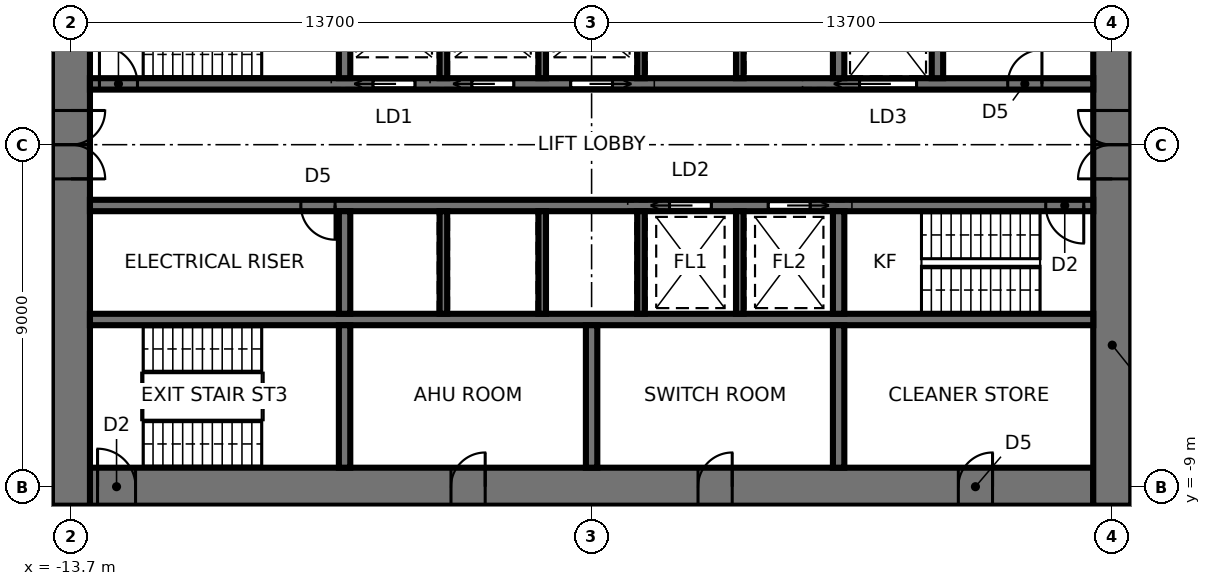
"""IFC4 building model, lengths in metres.
Left out: names, types, materials, properties, quantities, classifications, styles, units other than length and angle.
Written with IfcOpenShell. Run it as: python <this file> out.ifc"""

import sys

from ifc_helpers import new_model, si_unit, direction, frame, frame_2d, origin, place, context, subcontext, project, spatial, rectangle, extrude, element, fill, save


model = new_model("IFC4")
c1 = context("Model", 3, precision=1e-05, world=origin(), true_north=direction((0.0, 1.0)))
c2 = subcontext(c1, "Body", "Model", "MODEL_VIEW")
j1 = project(units=[si_unit("LENGTHUNIT", "METRE"), si_unit("PLANEANGLEUNIT", "RADIAN")], contexts=[c1])
p1 = place(None, origin())
s1 = spatial("IfcSite", under=j1, at=p1, CompositionType="ELEMENT")
p2 = place(p1, origin())
s2 = spatial("IfcBuilding", under=s1, at=p2, CompositionType="ELEMENT")
p3 = place(p2, frame((0.0, 0.0, 10.6)))
s3 = spatial("IfcBuildingStorey", under=s2, at=p3, CompositionType="ELEMENT", Elevation=10.6)
p4 = place(p3, frame((-13.2, -9.0, 0.0), z_axis=(0.0, 0.0, 1.0), x_axis=(1.0, 0.0, 0.0)))
e1 = element("IfcWall", 1, at=p4, inside=s3, PredefinedType="SHEAR", context=c2, shape_type="SweptSolid", body=[
    extrude(rectangle(XDim=26.4, YDim=1.0, at=frame_2d((13.2, 0.0))), origin(), (0.0, 0.0, 1.0), 4.5),
])
p5 = place(p4, frame((0.2, 0.0, 0.0)))
e2 = element("IfcOpeningElement", 2, at=p5, cuts=e1, PredefinedType="OPENING", context=c2, shape_type="SweptSolid", body=[
    extrude(rectangle(XDim=1.0, YDim=2.1, at=frame_2d((0.5, 1.05))), frame((0.0, 0.51, 0.0), z_axis=(0.0, -1.0, 0.0), x_axis=(1.0, 0.0, 0.0)), (0.0, 0.0, 1.0), 1.02),
])
p6 = place(p4, frame((9.5, 0.0, 0.0)))
e3 = element("IfcOpeningElement", 3, at=p6, cuts=e1, PredefinedType="OPENING", context=c2, shape_type="SweptSolid", body=[
    extrude(rectangle(XDim=0.9, YDim=2.1, at=frame_2d((0.45, 1.05))), frame((0.0, 0.51, 0.0), z_axis=(0.0, -1.0, 0.0), x_axis=(1.0, 0.0, 0.0)), (0.0, 0.0, 1.0), 1.02),
])
p7 = place(p4, frame((16.0, 0.0, 0.0)))
e4 = element("IfcOpeningElement", 4, at=p7, cuts=e1, PredefinedType="OPENING", context=c2, shape_type="SweptSolid", body=[
    extrude(rectangle(XDim=0.9, YDim=2.1, at=frame_2d((0.45, 1.05))), frame((0.0, 0.51, 0.0), z_axis=(0.0, -1.0, 0.0), x_axis=(1.0, 0.0, 0.0)), (0.0, 0.0, 1.0), 1.02),
])
p8 = place(p4, frame((22.85, 0.0, 0.0)))
e5 = element("IfcOpeningElement", 5, at=p8, cuts=e1, PredefinedType="OPENING", context=c2, shape_type="SweptSolid", body=[
    extrude(rectangle(XDim=0.9, YDim=2.1, at=frame_2d((0.45, 1.05))), frame((0.0, 0.51, 0.0), z_axis=(0.0, -1.0, 0.0), x_axis=(1.0, 0.0, 0.0)), (0.0, 0.0, 1.0), 1.02),
])
p9 = place(p3, frame((13.7, -9.5, 0.0), z_axis=(0.0, 0.0, 1.0), x_axis=(0.0, 1.0, 0.0)))
e6 = element("IfcWall", 6, at=p9, inside=s3, PredefinedType="SHEAR", context=c2, shape_type="SweptSolid", body=[
    extrude(rectangle(XDim=19.0, YDim=1.0, at=frame_2d((9.5, 0.0))), origin(), (0.0, 0.0, 1.0), 4.5),
])
p10 = place(p9, frame((8.6, 0.0, 0.0)))
e7 = element("IfcOpeningElement", 7, at=p10, cuts=e6, PredefinedType="OPENING", context=c2, shape_type="SweptSolid", body=[
    extrude(rectangle(XDim=1.8, YDim=2.4, at=frame_2d((0.9, 1.2))), frame((0.0, 0.51, 0.0), z_axis=(0.0, -1.0, 0.0), x_axis=(1.0, 0.0, 0.0)), (0.0, 0.0, 1.0), 1.02),
])
p11 = place(p3, frame((-13.7, 9.5, 0.0), z_axis=(0.0, 0.0, 1.0), x_axis=(0.0, -1.0, 0.0)))
e8 = element("IfcWall", 8, at=p11, inside=s3, PredefinedType="SHEAR", context=c2, shape_type="SweptSolid", body=[
    extrude(rectangle(XDim=19.0, YDim=1.0, at=frame_2d((9.5, 0.0))), origin(), (0.0, 0.0, 1.0), 4.5),
])
p12 = place(p11, frame((8.6, 0.0, 0.0)))
e9 = element("IfcOpeningElement", 9, at=p12, cuts=e8, PredefinedType="OPENING", context=c2, shape_type="SweptSolid", body=[
    extrude(rectangle(XDim=1.8, YDim=2.4, at=frame_2d((0.9, 1.2))), frame((0.0, 0.51, 0.0), z_axis=(0.0, -1.0, 0.0), x_axis=(1.0, 0.0, 0.0)), (0.0, 0.0, 1.0), 1.02),
])
p13 = place(p3, frame((-13.2, 1.6, 0.0), z_axis=(0.0, 0.0, 1.0), x_axis=(1.0, 0.0, 0.0)))
e10 = element("IfcWall", 10, at=p13, inside=s3, PredefinedType="SHEAR", context=c2, shape_type="SweptSolid", body=[
    extrude(rectangle(XDim=26.4, YDim=0.3, at=frame_2d((13.2, 0.0))), origin(), (0.0, 0.0, 1.0), 4.5),
])
p14 = place(p13, frame((0.25, 0.0, 0.0)))
e11 = element("IfcOpeningElement", 11, at=p14, cuts=e10, PredefinedType="OPENING", context=c2, shape_type="SweptSolid", body=[
    extrude(rectangle(XDim=1.0, YDim=2.1, at=frame_2d((0.5, 1.05))), frame((0.0, 0.16, 0.0), z_axis=(0.0, -1.0, 0.0), x_axis=(1.0, 0.0, 0.0)), (0.0, 0.0, 1.0), 0.32),
])
p15 = place(p13, frame((20.25, 0.0, 0.0)))
e12 = element("IfcOpeningElement", 12, at=p15, cuts=e10, PredefinedType="OPENING", context=c2, shape_type="SweptSolid", body=[
    extrude(rectangle(XDim=1.5, YDim=2.4, at=frame_2d((0.75, 1.2))), frame((0.0, 0.16, 0.0), z_axis=(0.0, -1.0, 0.0), x_axis=(1.0, 0.0, 0.0)), (0.0, 0.0, 1.0), 0.32),
])
p16 = place(p13, frame((7.45, 0.0, 0.0)))
e13 = element("IfcOpeningElement", 13, at=p16, cuts=e10, PredefinedType="OPENING", context=c2, shape_type="SweptSolid", body=[
    extrude(rectangle(XDim=1.1, YDim=2.3, at=frame_2d((0.55, 1.15))), frame((0.0, 0.16, 0.0), z_axis=(0.0, -1.0, 0.0), x_axis=(1.0, 0.0, 0.0)), (0.0, 0.0, 1.0), 0.32),
])
p17 = place(p13, frame((10.05, 0.0, 0.0)))
e14 = element("IfcOpeningElement", 14, at=p17, cuts=e10, PredefinedType="OPENING", context=c2, shape_type="SweptSolid", body=[
    extrude(rectangle(XDim=1.1, YDim=2.3, at=frame_2d((0.55, 1.15))), frame((0.0, 0.16, 0.0), z_axis=(0.0, -1.0, 0.0), x_axis=(1.0, 0.0, 0.0)), (0.0, 0.0, 1.0), 0.32),
])
p18 = place(p13, frame((12.65, 0.0, 0.0)))
e15 = element("IfcOpeningElement", 15, at=p18, cuts=e10, PredefinedType="OPENING", context=c2, shape_type="SweptSolid", body=[
    extrude(rectangle(XDim=1.1, YDim=2.3, at=frame_2d((0.55, 1.15))), frame((0.0, 0.16, 0.0), z_axis=(0.0, -1.0, 0.0), x_axis=(1.0, 0.0, 0.0)), (0.0, 0.0, 1.0), 0.32),
])
p19 = place(p13, frame((24.15, 0.0, 0.0)))
e16 = element("IfcOpeningElement", 16, at=p19, cuts=e10, PredefinedType="OPENING", context=c2, shape_type="SweptSolid", body=[
    extrude(rectangle(XDim=0.9, YDim=2.1, at=frame_2d((0.45, 1.05))), frame((0.0, 0.16, 0.0), z_axis=(0.0, -1.0, 0.0), x_axis=(1.0, 0.0, 0.0)), (0.0, 0.0, 1.0), 0.32),
])
p20 = place(p3, frame((-13.2, -1.6, 0.0), z_axis=(0.0, 0.0, 1.0), x_axis=(1.0, 0.0, 0.0)))
e17 = element("IfcWall", 17, at=p20, inside=s3, PredefinedType="SHEAR", context=c2, shape_type="SweptSolid", body=[
    extrude(rectangle(XDim=26.4, YDim=0.3, at=frame_2d((13.2, 0.0))), origin(), (0.0, 0.0, 1.0), 4.5),
])
p21 = place(p20, frame((25.15, 0.0, 0.0)))
e18 = element("IfcOpeningElement", 18, at=p21, cuts=e17, PredefinedType="OPENING", context=c2, shape_type="SweptSolid", body=[
    extrude(rectangle(XDim=1.0, YDim=2.1, at=frame_2d((0.5, 1.05))), frame((0.0, 0.16, 0.0), z_axis=(0.0, -1.0, 0.0), x_axis=(1.0, 0.0, 0.0)), (0.0, 0.0, 1.0), 0.32),
])
p22 = place(p20, frame((15.25, 0.0, 0.0)))
e19 = element("IfcOpeningElement", 19, at=p22, cuts=e17, PredefinedType="OPENING", context=c2, shape_type="SweptSolid", body=[
    extrude(rectangle(XDim=1.1, YDim=2.3, at=frame_2d((0.55, 1.15))), frame((0.0, 0.16, 0.0), z_axis=(0.0, -1.0, 0.0), x_axis=(1.0, 0.0, 0.0)), (0.0, 0.0, 1.0), 0.32),
])
p23 = place(p20, frame((17.85, 0.0, 0.0)))
e20 = element("IfcOpeningElement", 20, at=p23, cuts=e17, PredefinedType="OPENING", context=c2, shape_type="SweptSolid", body=[
    extrude(rectangle(XDim=1.1, YDim=2.3, at=frame_2d((0.55, 1.15))), frame((0.0, 0.16, 0.0), z_axis=(0.0, -1.0, 0.0), x_axis=(1.0, 0.0, 0.0)), (0.0, 0.0, 1.0), 0.32),
])
p24 = place(p20, frame((5.55, 0.0, 0.0)))
e21 = element("IfcOpeningElement", 21, at=p24, cuts=e17, PredefinedType="OPENING", context=c2, shape_type="SweptSolid", body=[
    extrude(rectangle(XDim=0.9, YDim=2.1, at=frame_2d((0.45, 1.05))), frame((0.0, 0.16, 0.0), z_axis=(0.0, -1.0, 0.0), x_axis=(1.0, 0.0, 0.0)), (0.0, 0.0, 1.0), 0.32),
])
p25 = place(p3, frame((-13.2, -4.6, 0.0), z_axis=(0.0, 0.0, 1.0), x_axis=(1.0, 0.0, 0.0)))
e22 = element("IfcWall", 22, at=p25, inside=s3, PredefinedType="SHEAR", context=c2, shape_type="SweptSolid", body=[
    extrude(rectangle(XDim=26.4, YDim=0.3, at=frame_2d((13.2, 0.0))), origin(), (0.0, 0.0, 1.0), 4.5),
])
for number, where, z_axis, x_axis in (
    (23, (-6.5, 1.75, 0.0), (0.0, 0.0, 1.0), (0.0, 1.0, 0.0)),
    (24, (6.5, 1.75, 0.0), (0.0, 0.0, 1.0), (0.0, 1.0, 0.0)),
):
    element("IfcWall", number, at=place(p3, frame(where, z_axis=z_axis, x_axis=x_axis)), inside=s3, PredefinedType="SHEAR", context=c2, shape_type="SweptSolid", body=[
        extrude(rectangle(XDim=2.7, YDim=0.3, at=frame_2d((1.35, 0.0))), origin(), (0.0, 0.0, 1.0), 4.5),
    ])
for number, where, z_axis, x_axis in (
    (25, (-3.9, 1.75, 0.0), (0.0, 0.0, 1.0), (0.0, 1.0, 0.0)),
    (26, (-1.3, 1.75, 0.0), (0.0, 0.0, 1.0), (0.0, 1.0, 0.0)),
    (27, (1.3, 1.75, 0.0), (0.0, 0.0, 1.0), (0.0, 1.0, 0.0)),
    (28, (3.9, 1.75, 0.0), (0.0, 0.0, 1.0), (0.0, 1.0, 0.0)),
):
    element("IfcWall", number, at=place(p3, frame(where, z_axis=z_axis, x_axis=x_axis)), inside=s3, PredefinedType="SHEAR", context=c2, shape_type="SweptSolid", body=[
        extrude(rectangle(XDim=2.7, YDim=0.2, at=frame_2d((1.35, 0.0))), origin(), (0.0, 0.0, 1.0), 4.5),
    ])
p26 = place(p3, frame((-6.5, -1.75, 0.0), z_axis=(0.0, 0.0, 1.0), x_axis=(0.0, -1.0, 0.0)))
e29 = element("IfcWall", 29, at=p26, inside=s3, PredefinedType="SHEAR", context=c2, shape_type="SweptSolid", body=[
    extrude(rectangle(XDim=2.7, YDim=0.3, at=frame_2d((1.35, 0.0))), origin(), (0.0, 0.0, 1.0), 4.5),
])
p27 = place(p3, frame((-6.5, -4.75, 0.0), z_axis=(0.0, 0.0, 1.0), x_axis=(0.0, -1.0, 0.0)))
e30 = element("IfcWall", 30, at=p27, inside=s3, PredefinedType="SHEAR", context=c2, shape_type="SweptSolid", body=[
    extrude(rectangle(XDim=3.75, YDim=0.3, at=frame_2d((1.875, 0.0))), origin(), (0.0, 0.0, 1.0), 4.5),
])
p28 = place(p3, frame((6.5, -1.75, 0.0), z_axis=(0.0, 0.0, 1.0), x_axis=(0.0, -1.0, 0.0)))
e31 = element("IfcWall", 31, at=p28, inside=s3, PredefinedType="SHEAR", context=c2, shape_type="SweptSolid", body=[
    extrude(rectangle(XDim=2.7, YDim=0.3, at=frame_2d((1.35, 0.0))), origin(), (0.0, 0.0, 1.0), 4.5),
])
p29 = place(p3, frame((6.5, -4.75, 0.0), z_axis=(0.0, 0.0, 1.0), x_axis=(0.0, -1.0, 0.0)))
e32 = element("IfcWall", 32, at=p29, inside=s3, PredefinedType="SHEAR", context=c2, shape_type="SweptSolid", body=[
    extrude(rectangle(XDim=3.75, YDim=0.3, at=frame_2d((1.875, 0.0))), origin(), (0.0, 0.0, 1.0), 4.5),
])
for number, where, z_axis, x_axis in (
    (33, (-3.9, -1.75, 0.0), (0.0, 0.0, 1.0), (0.0, -1.0, 0.0)),
    (34, (-1.3, -1.75, 0.0), (0.0, 0.0, 1.0), (0.0, -1.0, 0.0)),
    (35, (1.3, -1.75, 0.0), (0.0, 0.0, 1.0), (0.0, -1.0, 0.0)),
    (36, (3.9, -1.75, 0.0), (0.0, 0.0, 1.0), (0.0, -1.0, 0.0)),
):
    element("IfcWall", number, at=place(p3, frame(where, z_axis=z_axis, x_axis=x_axis)), inside=s3, PredefinedType="SHEAR", context=c2, shape_type="SweptSolid", body=[
        extrude(rectangle(XDim=2.7, YDim=0.2, at=frame_2d((1.35, 0.0))), origin(), (0.0, 0.0, 1.0), 4.5),
    ])
p30 = place(p3, frame((0.0, -4.75, 0.0), z_axis=(0.0, 0.0, 1.0), x_axis=(0.0, -1.0, 0.0)))
e37 = element("IfcWall", 37, at=p30, inside=s3, PredefinedType="SHEAR", context=c2, shape_type="SweptSolid", body=[
    extrude(rectangle(XDim=3.75, YDim=0.3, at=frame_2d((1.875, 0.0))), origin(), (0.0, 0.0, 1.0), 4.5),
])
p31 = place(p3, frame((9.1, 1.75, 0.0), z_axis=(0.0, 0.0, 1.0), x_axis=(0.0, 1.0, 0.0)))
e38 = element("IfcWall", 38, at=p31, inside=s3, PredefinedType="SHEAR", context=c2, shape_type="SweptSolid", body=[
    extrude(rectangle(XDim=2.7, YDim=0.3, at=frame_2d((1.35, 0.0))), origin(), (0.0, 0.0, 1.0), 4.5),
])
p32 = place(p12, origin())
e39 = element("IfcDoor", 39, at=p32, inside=s3, OperationType="DOUBLE_DOOR_SINGLE_SWING", PredefinedType="DOOR", context=c2, shape_type="SweptSolid", body=[
    extrude(rectangle(XDim=1.72, YDim=2.36, at=frame_2d((0.9, 1.18))), frame((0.0, 0.025, 0.0), z_axis=(0.0, -1.0, 0.0), x_axis=(1.0, 0.0, 0.0)), (0.0, 0.0, 1.0), 0.05),
    extrude(rectangle(XDim=0.04, YDim=2.4, at=frame_2d((0.02, 1.2))), frame((0.0, 0.25, 0.0), z_axis=(0.0, -1.0, 0.0), x_axis=(1.0, 0.0, 0.0)), (0.0, 0.0, 1.0), 0.5),
    extrude(rectangle(XDim=0.04, YDim=2.4, at=frame_2d((1.78, 1.2))), frame((0.0, 0.25, 0.0), z_axis=(0.0, -1.0, 0.0), x_axis=(1.0, 0.0, 0.0)), (0.0, 0.0, 1.0), 0.5),
    extrude(rectangle(XDim=1.72, YDim=0.04, at=frame_2d((0.9, 2.38))), frame((0.0, 0.25, 0.0), z_axis=(0.0, -1.0, 0.0), x_axis=(1.0, 0.0, 0.0)), (0.0, 0.0, 1.0), 0.5),
])
fill(e9, e39)
p33 = place(p10, origin())
e40 = element("IfcDoor", 40, at=p33, inside=s3, OperationType="DOUBLE_DOOR_SINGLE_SWING", PredefinedType="DOOR", context=c2, shape_type="SweptSolid", body=[
    extrude(rectangle(XDim=1.72, YDim=2.36, at=frame_2d((0.9, 1.18))), frame((0.0, 0.025, 0.0), z_axis=(0.0, -1.0, 0.0), x_axis=(1.0, 0.0, 0.0)), (0.0, 0.0, 1.0), 0.05),
    extrude(rectangle(XDim=0.04, YDim=2.4, at=frame_2d((0.02, 1.2))), frame((0.0, 0.25, 0.0), z_axis=(0.0, -1.0, 0.0), x_axis=(1.0, 0.0, 0.0)), (0.0, 0.0, 1.0), 0.5),
    extrude(rectangle(XDim=0.04, YDim=2.4, at=frame_2d((1.78, 1.2))), frame((0.0, 0.25, 0.0), z_axis=(0.0, -1.0, 0.0), x_axis=(1.0, 0.0, 0.0)), (0.0, 0.0, 1.0), 0.5),
    extrude(rectangle(XDim=1.72, YDim=0.04, at=frame_2d((0.9, 2.38))), frame((0.0, 0.25, 0.0), z_axis=(0.0, -1.0, 0.0), x_axis=(1.0, 0.0, 0.0)), (0.0, 0.0, 1.0), 0.5),
])
fill(e7, e40)
p34 = place(p14, origin())
e41 = element("IfcDoor", 41, at=p34, inside=s3, OperationType="SINGLE_SWING_LEFT", PredefinedType="DOOR", context=c2, shape_type="SweptSolid", body=[
    extrude(rectangle(XDim=1.0, YDim=2.1, at=frame_2d((0.5, 1.05))), frame((0.0, 0.025, 0.0), z_axis=(0.0, -1.0, 0.0), x_axis=(1.0, 0.0, 0.0)), (0.0, 0.0, 1.0), 0.05),
])
fill(e11, e41)
p35 = place(p21, frame((1.0, 0.0, 0.0), z_axis=(0.0, 0.0, 1.0), x_axis=(-1.0, 0.0, 0.0)))
e42 = element("IfcDoor", 42, at=p35, inside=s3, OperationType="SINGLE_SWING_LEFT", PredefinedType="DOOR", context=c2, shape_type="SweptSolid", body=[
    extrude(rectangle(XDim=1.0, YDim=2.1, at=frame_2d((0.5, 1.05))), frame((0.0, 0.025, 0.0), z_axis=(0.0, -1.0, 0.0), x_axis=(1.0, 0.0, 0.0)), (0.0, 0.0, 1.0), 0.05),
])
fill(e18, e42)
p36 = place(p5, origin())
e43 = element("IfcDoor", 43, at=p36, inside=s3, OperationType="SINGLE_SWING_LEFT", PredefinedType="DOOR", context=c2, shape_type="SweptSolid", body=[
    extrude(rectangle(XDim=0.92, YDim=2.06, at=frame_2d((0.5, 1.03))), frame((0.0, 0.025, 0.0), z_axis=(0.0, -1.0, 0.0), x_axis=(1.0, 0.0, 0.0)), (0.0, 0.0, 1.0), 0.05),
    extrude(rectangle(XDim=0.04, YDim=2.1, at=frame_2d((0.02, 1.05))), frame((0.0, 0.25, 0.0), z_axis=(0.0, -1.0, 0.0), x_axis=(1.0, 0.0, 0.0)), (0.0, 0.0, 1.0), 0.5),
    extrude(rectangle(XDim=0.04, YDim=2.1, at=frame_2d((0.98, 1.05))), frame((0.0, 0.25, 0.0), z_axis=(0.0, -1.0, 0.0), x_axis=(1.0, 0.0, 0.0)), (0.0, 0.0, 1.0), 0.5),
    extrude(rectangle(XDim=0.92, YDim=0.04, at=frame_2d((0.5, 2.08))), frame((0.0, 0.25, 0.0), z_axis=(0.0, -1.0, 0.0), x_axis=(1.0, 0.0, 0.0)), (0.0, 0.0, 1.0), 0.5),
])
fill(e2, e43)
p37 = place(p15, origin())
e44 = element("IfcDoor", 44, at=p37, inside=s3, OperationType="SLIDING_TO_LEFT", PredefinedType="DOOR", context=c2, shape_type="SweptSolid", body=[
    extrude(rectangle(XDim=1.5, YDim=2.4, at=frame_2d((0.75, 1.2))), frame((0.0, 0.025, 0.0), z_axis=(0.0, -1.0, 0.0), x_axis=(1.0, 0.0, 0.0)), (0.0, 0.0, 1.0), 0.05),
])
fill(e12, e44)
p38 = place(p16, origin())
e45 = element("IfcDoor", 45, at=p38, inside=s3, OperationType="SLIDING_TO_LEFT", PredefinedType="DOOR", context=c2, shape_type="SweptSolid", body=[
    extrude(rectangle(XDim=1.1, YDim=2.3, at=frame_2d((0.55, 1.15))), frame((0.0, 0.025, 0.0), z_axis=(0.0, -1.0, 0.0), x_axis=(1.0, 0.0, 0.0)), (0.0, 0.0, 1.0), 0.05),
])
fill(e13, e45)
p39 = place(p17, origin())
e46 = element("IfcDoor", 46, at=p39, inside=s3, OperationType="SLIDING_TO_LEFT", PredefinedType="DOOR", context=c2, shape_type="SweptSolid", body=[
    extrude(rectangle(XDim=1.1, YDim=2.3, at=frame_2d((0.55, 1.15))), frame((0.0, 0.025, 0.0), z_axis=(0.0, -1.0, 0.0), x_axis=(1.0, 0.0, 0.0)), (0.0, 0.0, 1.0), 0.05),
])
fill(e14, e46)
p40 = place(p18, origin())
e47 = element("IfcDoor", 47, at=p40, inside=s3, OperationType="SLIDING_TO_RIGHT", PredefinedType="DOOR", context=c2, shape_type="SweptSolid", body=[
    extrude(rectangle(XDim=1.1, YDim=2.3, at=frame_2d((0.55, 1.15))), frame((0.0, 0.025, 0.0), z_axis=(0.0, -1.0, 0.0), x_axis=(1.0, 0.0, 0.0)), (0.0, 0.0, 1.0), 0.05),
])
fill(e15, e47)
p41 = place(p22, frame((1.1, 0.0, 0.0), z_axis=(0.0, 0.0, 1.0), x_axis=(-1.0, 0.0, 0.0)))
e48 = element("IfcDoor", 48, at=p41, inside=s3, OperationType="SLIDING_TO_RIGHT", PredefinedType="DOOR", context=c2, shape_type="SweptSolid", body=[
    extrude(rectangle(XDim=1.1, YDim=2.3, at=frame_2d((0.55, 1.15))), frame((0.0, 0.025, 0.0), z_axis=(0.0, -1.0, 0.0), x_axis=(1.0, 0.0, 0.0)), (0.0, 0.0, 1.0), 0.05),
])
fill(e19, e48)
p42 = place(p23, frame((1.1, 0.0, 0.0), z_axis=(0.0, 0.0, 1.0), x_axis=(-1.0, 0.0, 0.0)))
e49 = element("IfcDoor", 49, at=p42, inside=s3, OperationType="SLIDING_TO_LEFT", PredefinedType="DOOR", context=c2, shape_type="SweptSolid", body=[
    extrude(rectangle(XDim=1.1, YDim=2.3, at=frame_2d((0.55, 1.15))), frame((0.0, 0.025, 0.0), z_axis=(0.0, -1.0, 0.0), x_axis=(1.0, 0.0, 0.0)), (0.0, 0.0, 1.0), 0.05),
])
fill(e20, e49)
p43 = place(p19, origin())
e50 = element("IfcDoor", 50, at=p43, inside=s3, OperationType="SINGLE_SWING_RIGHT", PredefinedType="DOOR", context=c2, shape_type="SweptSolid", body=[
    extrude(rectangle(XDim=0.9, YDim=2.1, at=frame_2d((0.45, 1.05))), frame((0.0, 0.025, 0.0), z_axis=(0.0, -1.0, 0.0), x_axis=(1.0, 0.0, 0.0)), (0.0, 0.0, 1.0), 0.05),
])
fill(e16, e50)
p44 = place(p24, frame((0.9, 0.0, 0.0), z_axis=(0.0, 0.0, 1.0), x_axis=(-1.0, 0.0, 0.0)))
e51 = element("IfcDoor", 51, at=p44, inside=s3, OperationType="SINGLE_SWING_LEFT", PredefinedType="DOOR", context=c2, shape_type="SweptSolid", body=[
    extrude(rectangle(XDim=0.9, YDim=2.1, at=frame_2d((0.45, 1.05))), frame((0.0, 0.025, 0.0), z_axis=(0.0, -1.0, 0.0), x_axis=(1.0, 0.0, 0.0)), (0.0, 0.0, 1.0), 0.05),
])
fill(e21, e51)
p45 = place(p6, origin())
e52 = element("IfcDoor", 52, at=p45, inside=s3, OperationType="SINGLE_SWING_RIGHT", PredefinedType="DOOR", context=c2, shape_type="SweptSolid", body=[
    extrude(rectangle(XDim=0.82, YDim=2.06, at=frame_2d((0.45, 1.03))), frame((0.0, 0.025, 0.0), z_axis=(0.0, -1.0, 0.0), x_axis=(1.0, 0.0, 0.0)), (0.0, 0.0, 1.0), 0.05),
    extrude(rectangle(XDim=0.04, YDim=2.1, at=frame_2d((0.02, 1.05))), frame((0.0, 0.25, 0.0), z_axis=(0.0, -1.0, 0.0), x_axis=(1.0, 0.0, 0.0)), (0.0, 0.0, 1.0), 0.5),
    extrude(rectangle(XDim=0.04, YDim=2.1, at=frame_2d((0.88, 1.05))), frame((0.0, 0.25, 0.0), z_axis=(0.0, -1.0, 0.0), x_axis=(1.0, 0.0, 0.0)), (0.0, 0.0, 1.0), 0.5),
    extrude(rectangle(XDim=0.82, YDim=0.04, at=frame_2d((0.45, 2.08))), frame((0.0, 0.25, 0.0), z_axis=(0.0, -1.0, 0.0), x_axis=(1.0, 0.0, 0.0)), (0.0, 0.0, 1.0), 0.5),
])
fill(e3, e52)
p46 = place(p7, origin())
e53 = element("IfcDoor", 53, at=p46, inside=s3, OperationType="SINGLE_SWING_RIGHT", PredefinedType="DOOR", context=c2, shape_type="SweptSolid", body=[
    extrude(rectangle(XDim=0.82, YDim=2.06, at=frame_2d((0.45, 1.03))), frame((0.0, 0.025, 0.0), z_axis=(0.0, -1.0, 0.0), x_axis=(1.0, 0.0, 0.0)), (0.0, 0.0, 1.0), 0.05),
    extrude(rectangle(XDim=0.04, YDim=2.1, at=frame_2d((0.02, 1.05))), frame((0.0, 0.25, 0.0), z_axis=(0.0, -1.0, 0.0), x_axis=(1.0, 0.0, 0.0)), (0.0, 0.0, 1.0), 0.5),
    extrude(rectangle(XDim=0.04, YDim=2.1, at=frame_2d((0.88, 1.05))), frame((0.0, 0.25, 0.0), z_axis=(0.0, -1.0, 0.0), x_axis=(1.0, 0.0, 0.0)), (0.0, 0.0, 1.0), 0.5),
    extrude(rectangle(XDim=0.82, YDim=0.04, at=frame_2d((0.45, 2.08))), frame((0.0, 0.25, 0.0), z_axis=(0.0, -1.0, 0.0), x_axis=(1.0, 0.0, 0.0)), (0.0, 0.0, 1.0), 0.5),
])
fill(e4, e53)
p47 = place(p8, origin())
e54 = element("IfcDoor", 54, at=p47, inside=s3, OperationType="SINGLE_SWING_RIGHT", PredefinedType="DOOR", context=c2, shape_type="SweptSolid", body=[
    extrude(rectangle(XDim=0.82, YDim=2.06, at=frame_2d((0.45, 1.03))), frame((0.0, 0.025, 0.0), z_axis=(0.0, -1.0, 0.0), x_axis=(1.0, 0.0, 0.0)), (0.0, 0.0, 1.0), 0.05),
    extrude(rectangle(XDim=0.04, YDim=2.1, at=frame_2d((0.02, 1.05))), frame((0.0, 0.25, 0.0), z_axis=(0.0, -1.0, 0.0), x_axis=(1.0, 0.0, 0.0)), (0.0, 0.0, 1.0), 0.5),
    extrude(rectangle(XDim=0.04, YDim=2.1, at=frame_2d((0.88, 1.05))), frame((0.0, 0.25, 0.0), z_axis=(0.0, -1.0, 0.0), x_axis=(1.0, 0.0, 0.0)), (0.0, 0.0, 1.0), 0.5),
    extrude(rectangle(XDim=0.82, YDim=0.04, at=frame_2d((0.45, 2.08))), frame((0.0, 0.25, 0.0), z_axis=(0.0, -1.0, 0.0), x_axis=(1.0, 0.0, 0.0)), (0.0, 0.0, 1.0), 0.5),
])
fill(e5, e54)
save(model, sys.argv[1])
